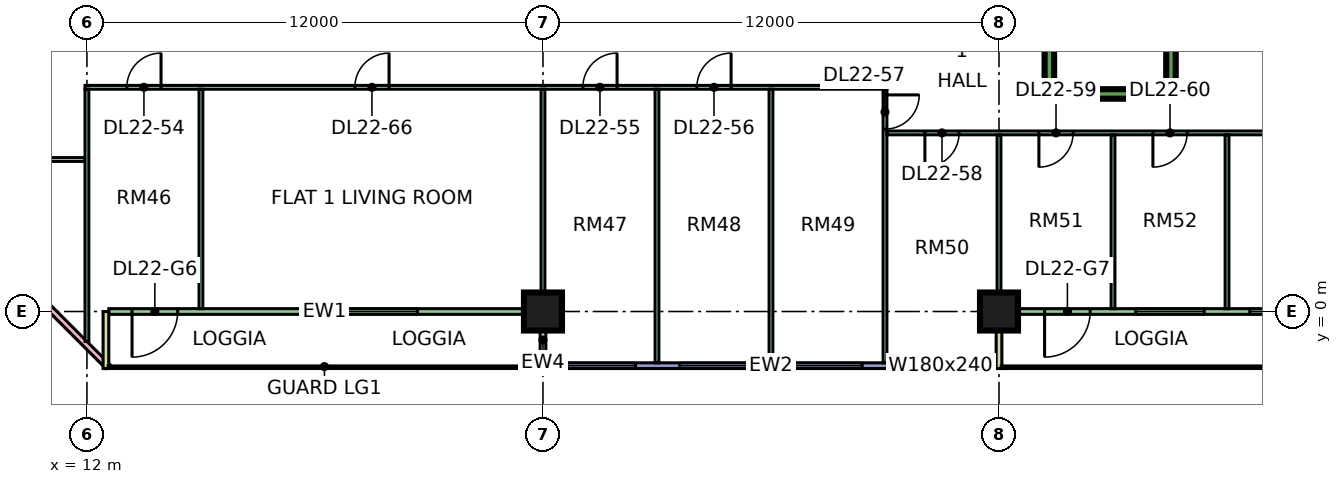
"""IFC4 building model, lengths in metres.
Left out: names, types, materials, properties, quantities, classifications, styles, units other than length and angle.
Written with IfcOpenShell. Run it as: python <this file> out.ifc"""

import sys

from ifc_helpers import new_model, si_unit, direction, frame, frame_2d, origin, origin_2d, place, context, subcontext, project, spatial, rectangle, extrude, element, fill, save


model = new_model("IFC4")
c1 = context("Model", 3, precision=1e-05, world=origin(), true_north=direction((0.0, 1.0)))
c2 = subcontext(c1, "Body", "Model", "MODEL_VIEW")
j1 = project(units=[si_unit("LENGTHUNIT", "METRE"), si_unit("PLANEANGLEUNIT", "RADIAN")], contexts=[c1])
p1 = place(None, origin())
s1 = spatial("IfcSite", under=j1, at=p1, CompositionType="ELEMENT")
p2 = place(p1, origin())
s2 = spatial("IfcBuilding", under=s1, at=p2, CompositionType="ELEMENT")
p3 = place(p2, frame((0.0, 0.0, 99.4)))
s3 = spatial("IfcBuildingStorey", under=s2, at=p3, CompositionType="ELEMENT", Elevation=99.4)
for number, where, z_axis, x_axis in (
    (1, (24.0, 0.0, 0.0), (0.0, 0.0, 1.0), (1.0, 0.0, 0.0)),
    (2, (36.0, 0.0, 0.0), (0.0, 0.0, 1.0), (1.0, 0.0, 0.0)),
):
    element("IfcColumn", number, at=place(p3, frame(where, z_axis=z_axis, x_axis=x_axis)), inside=s3, PredefinedType="COLUMN", context=c2, shape_type="SweptSolid", body=[
        extrude(rectangle(XDim=1.0, YDim=1.0, at=origin_2d()), origin(), (0.0, 0.0, 1.0), 3.75),
    ])
p4 = place(p3, frame((37.2, 5.725, 0.0), z_axis=(0.0, 0.0, 1.0), x_axis=(1.0, 0.0, 0.0)))
e3 = element("IfcWall", 3, at=p4, inside=s3, PredefinedType="SHEAR", context=c2, shape_type="SweptSolid", body=[
    extrude(rectangle(XDim=3.45, YDim=0.25, at=frame_2d((1.725, 0.0))), origin(), (0.0, 0.0, 1.0), 3.75),
])
for number, where, z_axis, x_axis in (
    (4, (37.325, 5.85, 0.0), (0.0, 0.0, 1.0), (0.0, 1.0, 0.0)),
    (5, (40.525, 5.85, 0.0), (0.0, 0.0, 1.0), (0.0, 1.0, 0.0)),
):
    element("IfcWall", number, at=place(p3, frame(where, z_axis=z_axis, x_axis=x_axis)), inside=s3, PredefinedType="SHEAR", context=c2, shape_type="SweptSolid", body=[
        extrude(rectangle(XDim=6.5, YDim=0.25, at=frame_2d((3.25, 0.0))), origin(), (0.0, 0.0, 1.0), 3.75),
    ])
p5 = place(p3, frame((-1.447, 12.553, 0.0), z_axis=(0.0, 0.0, 1.0), x_axis=(0.707106781187, -0.707106781187, 0.0)))
e6 = element("IfcWall", 6, at=p5, inside=s3, PredefinedType="SOLIDWALL", context=c2, shape_type="SweptSolid", body=[
    extrude(rectangle(XDim=19.799, YDim=0.15, at=frame_2d((9.899, 0.0))), origin(), (0.0, 0.0, 1.0), 3.35),
])
p6 = place(p5, frame((2.212, 0.0, 0.45)))
e7 = element("IfcOpeningElement", 7, at=p6, cuts=e6, PredefinedType="OPENING", context=c2, shape_type="SweptSolid", body=[
    extrude(rectangle(XDim=3.0, YDim=2.4, at=frame_2d((1.5, 1.2))), frame((0.0, 0.085, 0.0), z_axis=(0.0, -1.0, 0.0), x_axis=(1.0, 0.0, 0.0)), (0.0, 0.0, 1.0), 0.17),
])
p7 = place(p5, frame((10.216, 0.0, 0.45)))
e8 = element("IfcOpeningElement", 8, at=p7, cuts=e6, PredefinedType="OPENING", context=c2, shape_type="SweptSolid", body=[
    extrude(rectangle(XDim=3.0, YDim=2.4, at=frame_2d((1.5, 1.2))), frame((0.0, 0.085, 0.0), z_axis=(0.0, -1.0, 0.0), x_axis=(1.0, 0.0, 0.0)), (0.0, 0.0, 1.0), 0.17),
])
p8 = place(p3, frame((12.575, 0.0, 0.0), z_axis=(0.0, 0.0, 1.0), x_axis=(1.0, 0.0, 0.0)))
e9 = element("IfcWall", 9, at=p8, inside=s3, PredefinedType="SOLIDWALL", context=c2, shape_type="SweptSolid", body=[
    extrude(rectangle(XDim=11.35, YDim=0.15, at=frame_2d((5.675, 0.0))), origin(), (0.0, 0.0, 1.0), 3.35),
])
p9 = place(p8, frame((0.613, 0.0, 0.0)))
e10 = element("IfcOpeningElement", 10, at=p9, cuts=e9, PredefinedType="OPENING", context=c2, shape_type="SweptSolid", body=[
    extrude(rectangle(XDim=1.2, YDim=2.4, at=frame_2d((0.6, 1.2))), frame((0.0, 0.085, 0.0), z_axis=(0.0, -1.0, 0.0), x_axis=(1.0, 0.0, 0.0)), (0.0, 0.0, 1.0), 0.17),
])
p10 = place(p8, frame((5.125, 0.0, 0.45)))
e11 = element("IfcOpeningElement", 11, at=p10, cuts=e9, PredefinedType="OPENING", context=c2, shape_type="SweptSolid", body=[
    extrude(rectangle(XDim=3.0, YDim=2.4, at=frame_2d((1.5, 1.2))), frame((0.0, 0.085, 0.0), z_axis=(0.0, -1.0, 0.0), x_axis=(1.0, 0.0, 0.0)), (0.0, 0.0, 1.0), 0.17),
])
for number, where, z_axis, x_axis in (
    (12, (12.5, -1.5, 0.0), (0.0, 0.0, 1.0), (0.0, 1.0, 0.0)),
    (13, (24.0, -1.5, 0.0), (0.0, 0.0, 1.0), (0.0, 1.0, 0.0)),
):
    element("IfcWall", number, at=place(p3, frame(where, z_axis=z_axis, x_axis=x_axis)), inside=s3, PredefinedType="SOLIDWALL", context=c2, shape_type="SweptSolid", body=[
        extrude(rectangle(XDim=1.5, YDim=0.15, at=frame_2d((0.75, 0.0))), origin(), (0.0, 0.0, 1.0), 3.35),
    ])
p11 = place(p3, frame((24.075, -1.425, 0.0), z_axis=(0.0, 0.0, 1.0), x_axis=(1.0, 0.0, 0.0)))
e14 = element("IfcWall", 14, at=p11, inside=s3, PredefinedType="SOLIDWALL", context=c2, shape_type="SweptSolid", body=[
    extrude(rectangle(XDim=11.85, YDim=0.15, at=frame_2d((5.925, 0.0))), origin(), (0.0, 0.0, 1.0), 3.35),
])
p12 = place(p11, frame((0.562, 0.0, 0.45)))
e15 = element("IfcOpeningElement", 15, at=p12, cuts=e14, PredefinedType="OPENING", context=c2, shape_type="SweptSolid", body=[
    extrude(rectangle(XDim=1.8, YDim=2.4, at=frame_2d((0.9, 1.2))), frame((0.0, 0.085, 0.0), z_axis=(0.0, -1.0, 0.0), x_axis=(1.0, 0.0, 0.0)), (0.0, 0.0, 1.0), 0.17),
])
p13 = place(p11, frame((3.525, 0.0, 0.45)))
e16 = element("IfcOpeningElement", 16, at=p13, cuts=e14, PredefinedType="OPENING", context=c2, shape_type="SweptSolid", body=[
    extrude(rectangle(XDim=1.8, YDim=2.4, at=frame_2d((0.9, 1.2))), frame((0.0, 0.085, 0.0), z_axis=(0.0, -1.0, 0.0), x_axis=(1.0, 0.0, 0.0)), (0.0, 0.0, 1.0), 0.17),
])
p14 = place(p11, frame((6.525, 0.0, 0.45)))
e17 = element("IfcOpeningElement", 17, at=p14, cuts=e14, PredefinedType="OPENING", context=c2, shape_type="SweptSolid", body=[
    extrude(rectangle(XDim=1.8, YDim=2.4, at=frame_2d((0.9, 1.2))), frame((0.0, 0.085, 0.0), z_axis=(0.0, -1.0, 0.0), x_axis=(1.0, 0.0, 0.0)), (0.0, 0.0, 1.0), 0.17),
])
p15 = place(p11, frame((9.488, 0.0, 0.45)))
e18 = element("IfcOpeningElement", 18, at=p15, cuts=e14, PredefinedType="OPENING", context=c2, shape_type="SweptSolid", body=[
    extrude(rectangle(XDim=1.8, YDim=2.4, at=frame_2d((0.9, 1.2))), frame((0.0, 0.085, 0.0), z_axis=(0.0, -1.0, 0.0), x_axis=(1.0, 0.0, 0.0)), (0.0, 0.0, 1.0), 0.17),
])
p16 = place(p3, frame((36.075, 0.0, 0.0), z_axis=(0.0, 0.0, 1.0), x_axis=(1.0, 0.0, 0.0)))
e19 = element("IfcWall", 19, at=p16, inside=s3, PredefinedType="SOLIDWALL", context=c2, shape_type="SweptSolid", body=[
    extrude(rectangle(XDim=11.85, YDim=0.15, at=frame_2d((5.925, 0.0))), origin(), (0.0, 0.0, 1.0), 3.35),
])
p17 = place(p16, frame((1.125, 0.0, 0.0)))
e20 = element("IfcOpeningElement", 20, at=p17, cuts=e19, PredefinedType="OPENING", context=c2, shape_type="SweptSolid", body=[
    extrude(rectangle(XDim=1.2, YDim=2.4, at=frame_2d((0.6, 1.2))), frame((0.0, 0.085, 0.0), z_axis=(0.0, -1.0, 0.0), x_axis=(1.0, 0.0, 0.0)), (0.0, 0.0, 1.0), 0.17),
])
p18 = place(p16, frame((3.525, 0.0, 0.45)))
e21 = element("IfcOpeningElement", 21, at=p18, cuts=e19, PredefinedType="OPENING", context=c2, shape_type="SweptSolid", body=[
    extrude(rectangle(XDim=1.8, YDim=2.4, at=frame_2d((0.9, 1.2))), frame((0.0, 0.085, 0.0), z_axis=(0.0, -1.0, 0.0), x_axis=(1.0, 0.0, 0.0)), (0.0, 0.0, 1.0), 0.17),
])
p19 = place(p16, frame((6.525, 0.0, 0.45)))
e22 = element("IfcOpeningElement", 22, at=p19, cuts=e19, PredefinedType="OPENING", context=c2, shape_type="SweptSolid", body=[
    extrude(rectangle(XDim=1.2, YDim=2.4, at=frame_2d((0.6, 1.2))), frame((0.0, 0.085, 0.0), z_axis=(0.0, -1.0, 0.0), x_axis=(1.0, 0.0, 0.0)), (0.0, 0.0, 1.0), 0.17),
])
p20 = place(p16, frame((10.087, 0.0, 0.45)))
e23 = element("IfcOpeningElement", 23, at=p20, cuts=e19, PredefinedType="OPENING", context=c2, shape_type="SweptSolid", body=[
    extrude(rectangle(XDim=1.2, YDim=2.4, at=frame_2d((0.6, 1.2))), frame((0.0, 0.085, 0.0), z_axis=(0.0, -1.0, 0.0), x_axis=(1.0, 0.0, 0.0)), (0.0, 0.0, 1.0), 0.17),
])
p21 = place(p3, frame((36.0, -1.5, 0.0), z_axis=(0.0, 0.0, 1.0), x_axis=(0.0, 1.0, 0.0)))
e24 = element("IfcWall", 24, at=p21, inside=s3, PredefinedType="SOLIDWALL", context=c2, shape_type="SweptSolid", body=[
    extrude(rectangle(XDim=1.5, YDim=0.15, at=frame_2d((0.75, 0.0))), origin(), (0.0, 0.0, 1.0), 3.35),
])
p22 = place(p3, frame((9.05, 4.0, 0.0), z_axis=(0.0, 0.0, 1.0), x_axis=(1.0, 0.0, 0.0)))
e25 = element("IfcWall", 25, at=p22, inside=s3, PredefinedType="PARTITIONING", context=c2, shape_type="SweptSolid", body=[
    extrude(rectangle(XDim=2.9, YDim=0.1, at=frame_2d((1.45, 0.0))), origin(), (0.0, 0.0, 1.0), 3.35),
])
p23 = place(p3, frame((11.95, 5.9, 0.0), z_axis=(0.0, 0.0, 1.0), x_axis=(1.0, 0.0, 0.0)))
e26 = element("IfcWall", 26, at=p23, inside=s3, PredefinedType="PARTITIONING", context=c2, shape_type="SweptSolid", body=[
    extrude(rectangle(XDim=21.1, YDim=0.1, at=frame_2d((10.55, 0.0))), origin(), (0.0, 0.0, 1.0), 3.35),
])
p24 = place(p23, frame((1.1, 0.0, 0.0)))
e27 = element("IfcOpeningElement", 27, at=p24, cuts=e26, PredefinedType="OPENING", context=c2, shape_type="SweptSolid", body=[
    extrude(rectangle(XDim=0.9, YDim=2.1, at=frame_2d((0.45, 1.05))), frame((0.0, 0.06, 0.0), z_axis=(0.0, -1.0, 0.0), x_axis=(1.0, 0.0, 0.0)), (0.0, 0.0, 1.0), 0.12),
])
p25 = place(p23, frame((13.1, 0.0, 0.0)))
e28 = element("IfcOpeningElement", 28, at=p25, cuts=e26, PredefinedType="OPENING", context=c2, shape_type="SweptSolid", body=[
    extrude(rectangle(XDim=0.9, YDim=2.1, at=frame_2d((0.45, 1.05))), frame((0.0, 0.06, 0.0), z_axis=(0.0, -1.0, 0.0), x_axis=(1.0, 0.0, 0.0)), (0.0, 0.0, 1.0), 0.12),
])
p26 = place(p23, frame((16.1, 0.0, 0.0)))
e29 = element("IfcOpeningElement", 29, at=p26, cuts=e26, PredefinedType="OPENING", context=c2, shape_type="SweptSolid", body=[
    extrude(rectangle(XDim=0.9, YDim=2.1, at=frame_2d((0.45, 1.05))), frame((0.0, 0.06, 0.0), z_axis=(0.0, -1.0, 0.0), x_axis=(1.0, 0.0, 0.0)), (0.0, 0.0, 1.0), 0.12),
])
p27 = place(p23, frame((7.1, 0.0, 0.0)))
e30 = element("IfcOpeningElement", 30, at=p27, cuts=e26, PredefinedType="OPENING", context=c2, shape_type="SweptSolid", body=[
    extrude(rectangle(XDim=0.9, YDim=2.1, at=frame_2d((0.45, 1.05))), frame((0.0, 0.06, 0.0), z_axis=(0.0, -1.0, 0.0), x_axis=(1.0, 0.0, 0.0)), (0.0, 0.0, 1.0), 0.12),
])
p28 = place(p3, frame((12.0, -0.788, 0.0), z_axis=(0.0, 0.0, 1.0), x_axis=(0.0, 1.0, 0.0)))
e31 = element("IfcWall", 31, at=p28, inside=s3, PredefinedType="PARTITIONING", context=c2, shape_type="SweptSolid", body=[
    extrude(rectangle(XDim=6.638, YDim=0.1, at=frame_2d((3.319, 0.0))), origin(), (0.0, 0.0, 1.0), 3.35),
])
p29 = place(p3, frame((15.0, 0.074, 0.0), z_axis=(0.0, 0.0, 1.0), x_axis=(0.0, 1.0, 0.0)))
e32 = element("IfcWall", 32, at=p29, inside=s3, PredefinedType="PARTITIONING", context=c2, shape_type="SweptSolid", body=[
    extrude(rectangle(XDim=5.776, YDim=0.1, at=frame_2d((2.888, 0.0))), origin(), (0.0, 0.0, 1.0), 3.35),
])
p30 = place(p3, frame((24.0, 0.0, 0.0), z_axis=(0.0, 0.0, 1.0), x_axis=(0.0, 1.0, 0.0)))
e33 = element("IfcWall", 33, at=p30, inside=s3, PredefinedType="PARTITIONING", context=c2, shape_type="SweptSolid", body=[
    extrude(rectangle(XDim=5.85, YDim=0.1, at=frame_2d((2.925, 0.0))), origin(), (0.0, 0.0, 1.0), 3.35),
])
for number, where, z_axis, x_axis in (
    (34, (27.0, -1.351, 0.0), (0.0, 0.0, 1.0), (0.0, 1.0, 0.0)),
    (35, (30.0, -1.351, 0.0), (0.0, 0.0, 1.0), (0.0, 1.0, 0.0)),
):
    element("IfcWall", number, at=place(p3, frame(where, z_axis=z_axis, x_axis=x_axis)), inside=s3, PredefinedType="PARTITIONING", context=c2, shape_type="SweptSolid", body=[
        extrude(rectangle(XDim=7.201, YDim=0.1, at=frame_2d((3.601, 0.0))), origin(), (0.0, 0.0, 1.0), 3.35),
    ])
p31 = place(p3, frame((33.0, -1.351, 0.0), z_axis=(0.0, 0.0, 1.0), x_axis=(0.0, 1.0, 0.0)))
e36 = element("IfcWall", 36, at=p31, inside=s3, PredefinedType="PARTITIONING", context=c2, shape_type="SweptSolid", body=[
    extrude(rectangle(XDim=7.201, YDim=0.1, at=frame_2d((3.601, 0.0))), origin(), (0.0, 0.0, 1.0), 3.35),
])
p32 = place(p31, frame((6.151, 0.0, 0.0)))
e37 = element("IfcOpeningElement", 37, at=p32, cuts=e36, PredefinedType="OPENING", context=c2, shape_type="SweptSolid", body=[
    extrude(rectangle(XDim=0.9, YDim=2.1, at=frame_2d((0.45, 1.05))), frame((0.0, 0.06, 0.0), z_axis=(0.0, -1.0, 0.0), x_axis=(1.0, 0.0, 0.0)), (0.0, 0.0, 1.0), 0.12),
])
p33 = place(p3, frame((33.05, 4.7, 0.0), z_axis=(0.0, 0.0, 1.0), x_axis=(1.0, 0.0, 0.0)))
e38 = element("IfcWall", 38, at=p33, inside=s3, PredefinedType="PARTITIONING", context=c2, shape_type="SweptSolid", body=[
    extrude(rectangle(XDim=20.85, YDim=0.1, at=frame_2d((10.425, 0.0))), origin(), (0.0, 0.0, 1.0), 3.35),
])
p34 = place(p33, frame((1.0, 0.0, 0.0)))
e39 = element("IfcOpeningElement", 39, at=p34, cuts=e38, PredefinedType="OPENING", context=c2, shape_type="SweptSolid", body=[
    extrude(rectangle(XDim=0.9, YDim=2.1, at=frame_2d((0.45, 1.05))), frame((0.0, 0.06, 0.0), z_axis=(0.0, -1.0, 0.0), x_axis=(1.0, 0.0, 0.0)), (0.0, 0.0, 1.0), 0.12),
])
p35 = place(p33, frame((4.0, 0.0, 0.0)))
e40 = element("IfcOpeningElement", 40, at=p35, cuts=e38, PredefinedType="OPENING", context=c2, shape_type="SweptSolid", body=[
    extrude(rectangle(XDim=0.9, YDim=2.1, at=frame_2d((0.45, 1.05))), frame((0.0, 0.06, 0.0), z_axis=(0.0, -1.0, 0.0), x_axis=(1.0, 0.0, 0.0)), (0.0, 0.0, 1.0), 0.12),
])
p36 = place(p33, frame((7.0, 0.0, 0.0)))
e41 = element("IfcOpeningElement", 41, at=p36, cuts=e38, PredefinedType="OPENING", context=c2, shape_type="SweptSolid", body=[
    extrude(rectangle(XDim=0.9, YDim=2.1, at=frame_2d((0.45, 1.05))), frame((0.0, 0.06, 0.0), z_axis=(0.0, -1.0, 0.0), x_axis=(1.0, 0.0, 0.0)), (0.0, 0.0, 1.0), 0.12),
])
p37 = place(p33, frame((19.0, 0.0, 0.0)))
e42 = element("IfcOpeningElement", 42, at=p37, cuts=e38, PredefinedType="OPENING", context=c2, shape_type="SweptSolid", body=[
    extrude(rectangle(XDim=0.9, YDim=2.1, at=frame_2d((0.45, 1.05))), frame((0.0, 0.06, 0.0), z_axis=(0.0, -1.0, 0.0), x_axis=(1.0, 0.0, 0.0)), (0.0, 0.0, 1.0), 0.12),
])
p38 = place(p33, frame((13.0, 0.0, 0.0)))
e43 = element("IfcOpeningElement", 43, at=p38, cuts=e38, PredefinedType="OPENING", context=c2, shape_type="SweptSolid", body=[
    extrude(rectangle(XDim=0.9, YDim=2.1, at=frame_2d((0.45, 1.05))), frame((0.0, 0.06, 0.0), z_axis=(0.0, -1.0, 0.0), x_axis=(1.0, 0.0, 0.0)), (0.0, 0.0, 1.0), 0.12),
])
p39 = place(p3, frame((36.0, 0.0, 0.0), z_axis=(0.0, 0.0, 1.0), x_axis=(0.0, 1.0, 0.0)))
e44 = element("IfcWall", 44, at=p39, inside=s3, PredefinedType="PARTITIONING", context=c2, shape_type="SweptSolid", body=[
    extrude(rectangle(XDim=4.65, YDim=0.1, at=frame_2d((2.325, 0.0))), origin(), (0.0, 0.0, 1.0), 3.35),
])
for number, where, z_axis, x_axis in (
    (45, (39.0, 0.074, 0.0), (0.0, 0.0, 1.0), (0.0, 1.0, 0.0)),
    (46, (42.0, 0.074, 0.0), (0.0, 0.0, 1.0), (0.0, 1.0, 0.0)),
):
    element("IfcWall", number, at=place(p3, frame(where, z_axis=z_axis, x_axis=x_axis)), inside=s3, PredefinedType="PARTITIONING", context=c2, shape_type="SweptSolid", body=[
        extrude(rectangle(XDim=4.576, YDim=0.1, at=frame_2d((2.288, 0.0))), origin(), (0.0, 0.0, 1.0), 3.35),
    ])
p40 = place(p9, frame((1.2, 0.0, 0.0), z_axis=(0.0, 0.0, 1.0), x_axis=(-1.0, 0.0, 0.0)))
e47 = element("IfcDoor", 47, at=p40, inside=s3, OperationType="DOUBLE_DOOR_SINGLE_SWING", PredefinedType="DOOR", context=c2, shape_type="SweptSolid", body=[
    extrude(rectangle(XDim=1.2, YDim=2.4, at=frame_2d((0.6, 1.2))), frame((0.0, 0.025, 0.0), z_axis=(0.0, -1.0, 0.0), x_axis=(1.0, 0.0, 0.0)), (0.0, 0.0, 1.0), 0.05),
])
fill(e10, e47)
p41 = place(p10, origin())
e48 = element("IfcWindow", 48, at=p41, inside=s3, PartitioningType="SINGLE_PANEL", PredefinedType="WINDOW", context=c2, shape_type="SweptSolid", body=[
    extrude(rectangle(XDim=3.0, YDim=2.4, at=frame_2d((1.5, 1.2))), frame((0.0, 0.03, 0.0), z_axis=(0.0, -1.0, 0.0), x_axis=(1.0, 0.0, 0.0)), (0.0, 0.0, 1.0), 0.06),
])
fill(e11, e48)
p42 = place(p12, origin())
e49 = element("IfcWindow", 49, at=p42, inside=s3, PartitioningType="SINGLE_PANEL", PredefinedType="WINDOW", context=c2, shape_type="SweptSolid", body=[
    extrude(rectangle(XDim=1.8, YDim=2.4, at=frame_2d((0.9, 1.2))), frame((0.0, 0.03, 0.0), z_axis=(0.0, -1.0, 0.0), x_axis=(1.0, 0.0, 0.0)), (0.0, 0.0, 1.0), 0.06),
])
fill(e15, e49)
p43 = place(p13, origin())
e50 = element("IfcWindow", 50, at=p43, inside=s3, PartitioningType="SINGLE_PANEL", PredefinedType="WINDOW", context=c2, shape_type="SweptSolid", body=[
    extrude(rectangle(XDim=1.8, YDim=2.4, at=frame_2d((0.9, 1.2))), frame((0.0, 0.03, 0.0), z_axis=(0.0, -1.0, 0.0), x_axis=(1.0, 0.0, 0.0)), (0.0, 0.0, 1.0), 0.06),
])
fill(e16, e50)
p44 = place(p14, origin())
e51 = element("IfcWindow", 51, at=p44, inside=s3, PartitioningType="SINGLE_PANEL", PredefinedType="WINDOW", context=c2, shape_type="SweptSolid", body=[
    extrude(rectangle(XDim=1.8, YDim=2.4, at=frame_2d((0.9, 1.2))), frame((0.0, 0.03, 0.0), z_axis=(0.0, -1.0, 0.0), x_axis=(1.0, 0.0, 0.0)), (0.0, 0.0, 1.0), 0.06),
])
fill(e17, e51)
p45 = place(p15, origin())
e52 = element("IfcWindow", 52, at=p45, inside=s3, PartitioningType="SINGLE_PANEL", PredefinedType="WINDOW", context=c2, shape_type="SweptSolid", body=[
    extrude(rectangle(XDim=1.8, YDim=2.4, at=frame_2d((0.9, 1.2))), frame((0.0, 0.03, 0.0), z_axis=(0.0, -1.0, 0.0), x_axis=(1.0, 0.0, 0.0)), (0.0, 0.0, 1.0), 0.06),
])
fill(e18, e52)
p46 = place(p17, frame((1.2, 0.0, 0.0), z_axis=(0.0, 0.0, 1.0), x_axis=(-1.0, 0.0, 0.0)))
e53 = element("IfcDoor", 53, at=p46, inside=s3, OperationType="DOUBLE_DOOR_SINGLE_SWING", PredefinedType="DOOR", context=c2, shape_type="SweptSolid", body=[
    extrude(rectangle(XDim=1.2, YDim=2.4, at=frame_2d((0.6, 1.2))), frame((0.0, 0.025, 0.0), z_axis=(0.0, -1.0, 0.0), x_axis=(1.0, 0.0, 0.0)), (0.0, 0.0, 1.0), 0.05),
])
fill(e20, e53)
p47 = place(p18, origin())
e54 = element("IfcWindow", 54, at=p47, inside=s3, PartitioningType="SINGLE_PANEL", PredefinedType="WINDOW", context=c2, shape_type="SweptSolid", body=[
    extrude(rectangle(XDim=1.8, YDim=2.4, at=frame_2d((0.9, 1.2))), frame((0.0, 0.03, 0.0), z_axis=(0.0, -1.0, 0.0), x_axis=(1.0, 0.0, 0.0)), (0.0, 0.0, 1.0), 0.06),
])
fill(e21, e54)
p48 = place(p19, origin())
e55 = element("IfcWindow", 55, at=p48, inside=s3, PartitioningType="SINGLE_PANEL", PredefinedType="WINDOW", context=c2, shape_type="SweptSolid", body=[
    extrude(rectangle(XDim=1.2, YDim=2.4, at=frame_2d((0.6, 1.2))), frame((0.0, 0.03, 0.0), z_axis=(0.0, -1.0, 0.0), x_axis=(1.0, 0.0, 0.0)), (0.0, 0.0, 1.0), 0.06),
])
fill(e22, e55)
p49 = place(p24, frame((0.9, 0.0, 0.0), z_axis=(0.0, 0.0, 1.0), x_axis=(-1.0, 0.0, 0.0)))
e56 = element("IfcDoor", 56, at=p49, inside=s3, OperationType="SINGLE_SWING_RIGHT", PredefinedType="DOOR", context=c2, shape_type="SweptSolid", body=[
    extrude(rectangle(XDim=0.9, YDim=2.1, at=frame_2d((0.45, 1.05))), frame((0.0, 0.025, 0.0), z_axis=(0.0, -1.0, 0.0), x_axis=(1.0, 0.0, 0.0)), (0.0, 0.0, 1.0), 0.05),
])
fill(e27, e56)
p50 = place(p25, frame((0.9, 0.0, 0.0), z_axis=(0.0, 0.0, 1.0), x_axis=(-1.0, 0.0, 0.0)))
e57 = element("IfcDoor", 57, at=p50, inside=s3, OperationType="SINGLE_SWING_RIGHT", PredefinedType="DOOR", context=c2, shape_type="SweptSolid", body=[
    extrude(rectangle(XDim=0.9, YDim=2.1, at=frame_2d((0.45, 1.05))), frame((0.0, 0.025, 0.0), z_axis=(0.0, -1.0, 0.0), x_axis=(1.0, 0.0, 0.0)), (0.0, 0.0, 1.0), 0.05),
])
fill(e28, e57)
p51 = place(p26, frame((0.9, 0.0, 0.0), z_axis=(0.0, 0.0, 1.0), x_axis=(-1.0, 0.0, 0.0)))
e58 = element("IfcDoor", 58, at=p51, inside=s3, OperationType="SINGLE_SWING_RIGHT", PredefinedType="DOOR", context=c2, shape_type="SweptSolid", body=[
    extrude(rectangle(XDim=0.9, YDim=2.1, at=frame_2d((0.45, 1.05))), frame((0.0, 0.025, 0.0), z_axis=(0.0, -1.0, 0.0), x_axis=(1.0, 0.0, 0.0)), (0.0, 0.0, 1.0), 0.05),
])
fill(e29, e58)
p52 = place(p32, origin())
e59 = element("IfcDoor", 59, at=p52, inside=s3, OperationType="SINGLE_SWING_RIGHT", PredefinedType="DOOR", context=c2, shape_type="SweptSolid", body=[
    extrude(rectangle(XDim=0.9, YDim=2.1, at=frame_2d((0.45, 1.05))), frame((0.0, 0.025, 0.0), z_axis=(0.0, -1.0, 0.0), x_axis=(1.0, 0.0, 0.0)), (0.0, 0.0, 1.0), 0.05),
])
fill(e37, e59)
p53 = place(p34, frame((0.9, 0.0, 0.0), z_axis=(0.0, 0.0, 1.0), x_axis=(-1.0, 0.0, 0.0)))
e60 = element("IfcDoor", 60, at=p53, inside=s3, OperationType="SINGLE_SWING_LEFT", PredefinedType="DOOR", context=c2, shape_type="SweptSolid", body=[
    extrude(rectangle(XDim=0.9, YDim=2.1, at=frame_2d((0.45, 1.05))), frame((0.0, 0.025, 0.0), z_axis=(0.0, -1.0, 0.0), x_axis=(1.0, 0.0, 0.0)), (0.0, 0.0, 1.0), 0.05),
])
fill(e39, e60)
p54 = place(p35, frame((0.9, 0.0, 0.0), z_axis=(0.0, 0.0, 1.0), x_axis=(-1.0, 0.0, 0.0)))
e61 = element("IfcDoor", 61, at=p54, inside=s3, OperationType="SINGLE_SWING_LEFT", PredefinedType="DOOR", context=c2, shape_type="SweptSolid", body=[
    extrude(rectangle(XDim=0.9, YDim=2.1, at=frame_2d((0.45, 1.05))), frame((0.0, 0.025, 0.0), z_axis=(0.0, -1.0, 0.0), x_axis=(1.0, 0.0, 0.0)), (0.0, 0.0, 1.0), 0.05),
])
fill(e40, e61)
p55 = place(p36, frame((0.9, 0.0, 0.0), z_axis=(0.0, 0.0, 1.0), x_axis=(-1.0, 0.0, 0.0)))
e62 = element("IfcDoor", 62, at=p55, inside=s3, OperationType="SINGLE_SWING_LEFT", PredefinedType="DOOR", context=c2, shape_type="SweptSolid", body=[
    extrude(rectangle(XDim=0.9, YDim=2.1, at=frame_2d((0.45, 1.05))), frame((0.0, 0.025, 0.0), z_axis=(0.0, -1.0, 0.0), x_axis=(1.0, 0.0, 0.0)), (0.0, 0.0, 1.0), 0.05),
])
fill(e41, e62)
p56 = place(p27, frame((0.9, 0.0, 0.0), z_axis=(0.0, 0.0, 1.0), x_axis=(-1.0, 0.0, 0.0)))
e63 = element("IfcDoor", 63, at=p56, inside=s3, OperationType="SINGLE_SWING_RIGHT", PredefinedType="DOOR", context=c2, shape_type="SweptSolid", body=[
    extrude(rectangle(XDim=0.9, YDim=2.1, at=frame_2d((0.45, 1.05))), frame((0.0, 0.025, 0.0), z_axis=(0.0, -1.0, 0.0), x_axis=(1.0, 0.0, 0.0)), (0.0, 0.0, 1.0), 0.05),
])
fill(e30, e63)
save(model, sys.argv[1])
